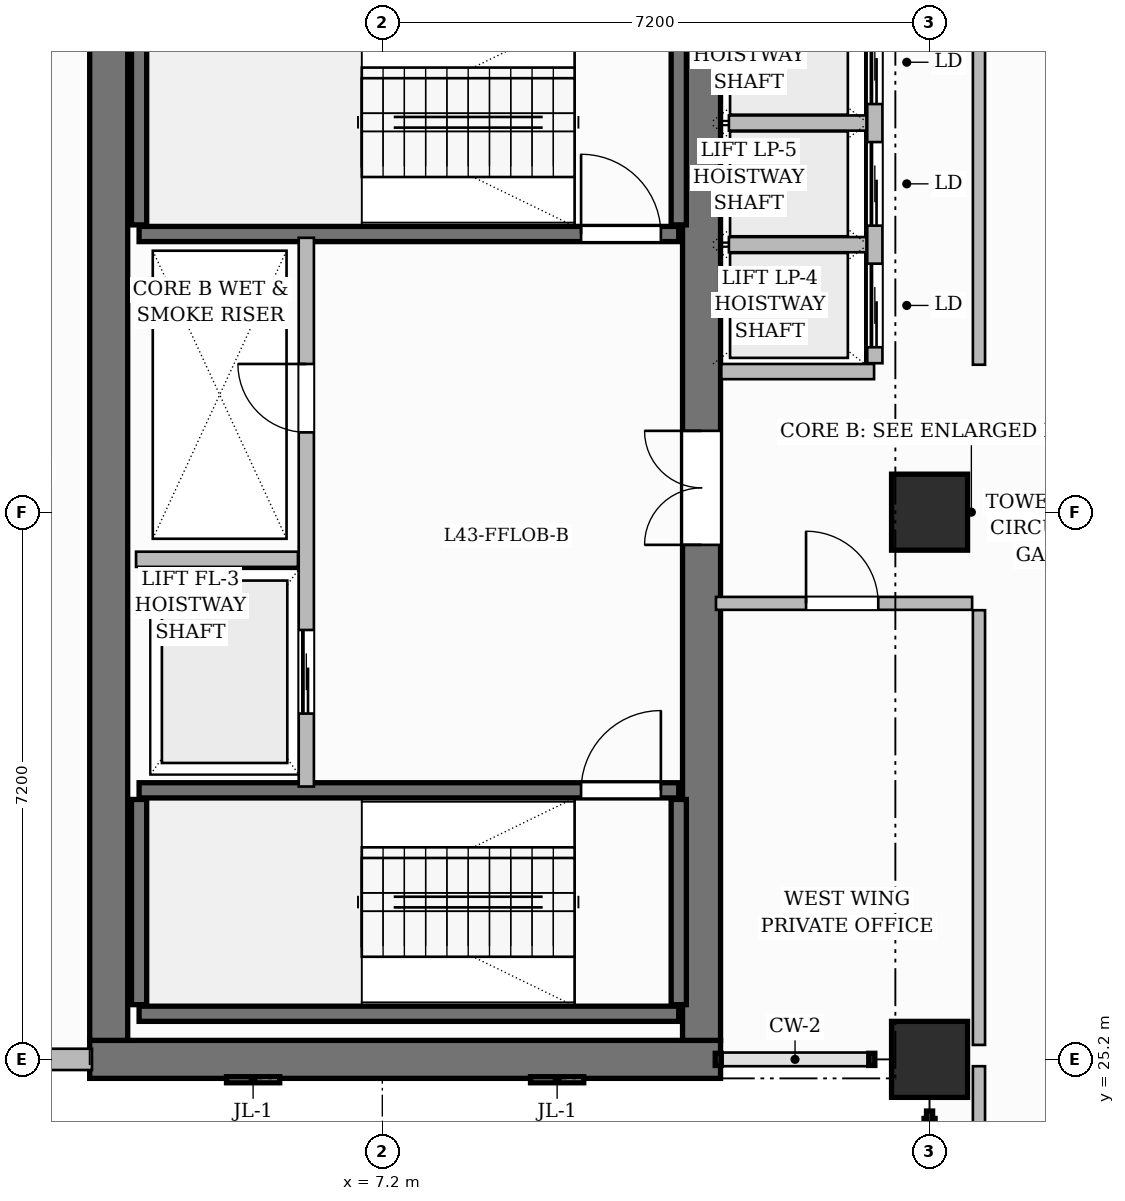
"""IFC4 building model, lengths in metres.
Left out: names, types, materials, properties, quantities, classifications, styles, units other than length and angle.
Written with IfcOpenShell. Run it as: python <this file> out.ifc"""

import sys

from ifc_helpers import new_model, si_unit, direction, frame, frame_2d, origin, origin_2d, place, context, subcontext, project, spatial, rectangle, extrude, source, transform, mapped, element, fill, save


model = new_model("IFC4")
c1 = context("Model", 3, precision=1e-05, world=origin(), true_north=direction((0.0, 1.0)))
c2 = subcontext(c1, "Body", "Model", "MODEL_VIEW")
j1 = project(units=[si_unit("LENGTHUNIT", "METRE"), si_unit("PLANEANGLEUNIT", "RADIAN")], contexts=[c1])
p1 = place(None, origin())
s1 = spatial("IfcSite", under=j1, at=p1, CompositionType="ELEMENT")
p2 = place(p1, origin())
s2 = spatial("IfcBuilding", under=s1, at=p2, CompositionType="ELEMENT")
p3 = place(p2, frame((0.0, 0.0, 173.4)))
s3 = spatial("IfcBuildingStorey", under=s2, at=p3, CompositionType="ELEMENT", Elevation=173.4)
p4 = place(p3, frame((3.35, 25.2, 0.0), z_axis=(0.0, 0.0, 1.0), x_axis=(1.0, 0.0, 0.0)))
e1 = element("IfcWall", 1, at=p4, inside=s3, PredefinedType="SHEAR", context=c2, shape_type="SweptSolid", body=[
    extrude(rectangle(XDim=8.3, YDim=0.5, at=frame_2d((4.15, 0.0))), origin(), (0.0, 0.0, 1.0), 3.85),
])
p5 = place(p3, frame((3.6, 25.45, 0.0), z_axis=(0.0, 0.0, 1.0), x_axis=(0.0, 1.0, 0.0)))
e2 = element("IfcWall", 2, at=p5, inside=s3, PredefinedType="SHEAR", context=c2, shape_type="SweptSolid", body=[
    extrude(rectangle(XDim=13.9, YDim=0.5, at=frame_2d((6.95, 0.0))), origin(), (0.0, 0.0, 1.0), 3.85),
])
p6 = place(p3, frame((11.4, 25.45, 0.0), z_axis=(0.0, 0.0, 1.0), x_axis=(0.0, 1.0, 0.0)))
e3 = element("IfcWall", 3, at=p6, inside=s3, PredefinedType="SHEAR", context=c2, shape_type="SweptSolid", body=[
    extrude(rectangle(XDim=13.9, YDim=0.5, at=frame_2d((6.95, 0.0))), origin(), (0.0, 0.0, 1.0), 3.85),
])
p7 = place(p6, frame((6.52, 0.0, 0.0)))
e4 = element("IfcOpeningElement", 4, at=p7, cuts=e3, PredefinedType="OPENING", context=c2, shape_type="SweptSolid", body=[
    extrude(rectangle(XDim=1.5, YDim=2.2, at=frame_2d((0.75, 1.1))), frame((0.0, 0.26, 0.0), z_axis=(0.0, -1.0, 0.0), x_axis=(1.0, 0.0, 0.0)), (0.0, 0.0, 1.0), 0.52),
])
m1 = source(origin(), c2, "Body", "SweptSolid", [
    extrude(rectangle(XDim=1.0, YDim=1.0, at=origin_2d()), origin(), (0.0, 0.0, 1.0), 3.85),
])
for number, where, z_axis, x_axis in (
    (5, (14.4, 25.2, 0.0), (0.0, 0.0, 1.0), (1.0, 0.0, 0.0)),
    (6, (14.4, 32.4, 0.0), (0.0, 0.0, 1.0), (1.0, 0.0, 0.0)),
):
    element("IfcColumn", number, at=place(p3, frame(where, z_axis=z_axis, x_axis=x_axis)), inside=s3, PredefinedType="COLUMN", context=c2, shape_type="MappedRepresentation", body=[
        mapped(m1, transform((0.0, 0.0, 0.0), scale=1.0)),
    ])
p8 = place(p3, frame((4.0, 25.8, 0.0), z_axis=(0.0, 0.0, 1.0), x_axis=(1.0, 0.0, 0.0)))
e7 = element("IfcWall", 7, at=p8, inside=s3, PredefinedType="SHEAR", context=c2, shape_type="SweptSolid", body=[
    extrude(rectangle(XDim=7.1, YDim=0.2, at=frame_2d((3.55, 0.0))), origin(), (0.0, 0.0, 1.0), 3.85),
])
for number, where, z_axis, x_axis in (
    (8, (4.0, 25.92, 0.0), (0.0, 0.0, 1.0), (0.0, 1.0, 0.0)),
    (9, (11.1, 25.92, 0.0), (0.0, 0.0, 1.0), (0.0, 1.0, 0.0)),
):
    element("IfcWall", number, at=place(p3, frame(where, z_axis=z_axis, x_axis=x_axis)), inside=s3, PredefinedType="SHEAR", context=c2, shape_type="SweptSolid", body=[
        extrude(rectangle(XDim=2.7, YDim=0.2, at=frame_2d((1.35, 0.0))), origin(), (0.0, 0.0, 1.0), 3.85),
    ])
p9 = place(p3, frame((4.0, 28.74, 0.0), z_axis=(0.0, 0.0, 1.0), x_axis=(1.0, 0.0, 0.0)))
e10 = element("IfcWall", 10, at=p9, inside=s3, PredefinedType="SHEAR", context=c2, shape_type="SweptSolid", body=[
    extrude(rectangle(XDim=7.1, YDim=0.2, at=frame_2d((3.55, 0.0))), origin(), (0.0, 0.0, 1.0), 3.85),
])
p10 = place(p9, frame((5.815, 0.0, 0.0)))
e11 = element("IfcOpeningElement", 11, at=p10, cuts=e10, PredefinedType="OPENING", context=c2, shape_type="SweptSolid", body=[
    extrude(rectangle(XDim=1.05, YDim=2.2, at=frame_2d((0.525, 1.1))), frame((0.0, 0.11, 0.0), z_axis=(0.0, -1.0, 0.0), x_axis=(1.0, 0.0, 0.0)), (0.0, 0.0, 1.0), 0.22),
])
for number, where, z_axis, x_axis in (
    (12, (4.0, 36.18, 0.0), (0.0, 0.0, 1.0), (0.0, 1.0, 0.0)),
    (13, (11.1, 36.18, 0.0), (0.0, 0.0, 1.0), (0.0, 1.0, 0.0)),
):
    element("IfcWall", number, at=place(p3, frame(where, z_axis=z_axis, x_axis=x_axis)), inside=s3, PredefinedType="SHEAR", context=c2, shape_type="SweptSolid", body=[
        extrude(rectangle(XDim=2.7, YDim=0.2, at=frame_2d((1.35, 0.0))), origin(), (0.0, 0.0, 1.0), 3.85),
    ])
p11 = place(p3, frame((4.0, 36.06, 0.0), z_axis=(0.0, 0.0, 1.0), x_axis=(1.0, 0.0, 0.0)))
e14 = element("IfcWall", 14, at=p11, inside=s3, PredefinedType="SHEAR", context=c2, shape_type="SweptSolid", body=[
    extrude(rectangle(XDim=7.1, YDim=0.2, at=frame_2d((3.55, 0.0))), origin(), (0.0, 0.0, 1.0), 3.85),
])
p12 = place(p11, frame((5.815, 0.0, 0.0)))
e15 = element("IfcOpeningElement", 15, at=p12, cuts=e14, PredefinedType="OPENING", context=c2, shape_type="SweptSolid", body=[
    extrude(rectangle(XDim=1.05, YDim=2.2, at=frame_2d((0.525, 1.1))), frame((0.0, 0.11, 0.0), z_axis=(0.0, -1.0, 0.0), x_axis=(1.0, 0.0, 0.0)), (0.0, 0.0, 1.0), 0.22),
])
p13 = place(p3, frame((6.2, 28.79, 0.0), z_axis=(0.0, 0.0, 1.0), x_axis=(0.0, 1.0, 0.0)))
e16 = element("IfcWall", 16, at=p13, inside=s3, PredefinedType="PARTITIONING", context=c2, shape_type="SweptSolid", body=[
    extrude(rectangle(XDim=7.22, YDim=0.2, at=frame_2d((3.61, 0.0))), origin(), (0.0, 0.0, 1.0), 3.6),
])
p14 = place(p13, frame((4.66, 0.0, 0.0)))
e17 = element("IfcOpeningElement", 17, at=p14, cuts=e16, PredefinedType="OPENING", context=c2, shape_type="SweptSolid", body=[
    extrude(rectangle(XDim=0.9, YDim=2.1, at=frame_2d((0.45, 1.05))), frame((0.0, 0.11, 0.0), z_axis=(0.0, -1.0, 0.0), x_axis=(1.0, 0.0, 0.0)), (0.0, 0.0, 1.0), 0.22),
])
p15 = place(p13, frame((0.96, 0.0, 0.0)))
e18 = element("IfcOpeningElement", 18, at=p15, cuts=e16, PredefinedType="OPENING", context=c2, shape_type="SweptSolid", body=[
    extrude(rectangle(XDim=1.1, YDim=2.2, at=frame_2d((0.55, 1.1))), frame((0.0, 0.11, 0.0), z_axis=(0.0, -1.0, 0.0), x_axis=(1.0, 0.0, 0.0)), (0.0, 0.0, 1.0), 0.22),
])
p16 = place(p3, frame((3.96, 31.78, 0.0), z_axis=(0.0, 0.0, 1.0), x_axis=(1.0, 0.0, 0.0)))
e19 = element("IfcWall", 19, at=p16, inside=s3, PredefinedType="PARTITIONING", context=c2, shape_type="SweptSolid", body=[
    extrude(rectangle(XDim=2.13, YDim=0.2, at=frame_2d((1.065, 0.0))), origin(), (0.0, 0.0, 1.0), 3.6),
])
p17 = place(p3, frame((11.66, 34.25, 0.0), z_axis=(0.0, 0.0, 1.0), x_axis=(1.0, 0.0, 0.0)))
e20 = element("IfcWall", 20, at=p17, inside=s3, PredefinedType="PARTITIONING", context=c2, shape_type="SweptSolid", body=[
    extrude(rectangle(XDim=2.01, YDim=0.2, at=frame_2d((1.005, 0.0))), origin(), (0.0, 0.0, 1.0), 3.6),
])
p18 = place(p3, frame((13.68, 34.36, 0.0), z_axis=(0.0, 0.0, 1.0), x_axis=(0.0, 1.0, 0.0)))
e21 = element("IfcWall", 21, at=p18, inside=s3, PredefinedType="PARTITIONING", context=c2, shape_type="SweptSolid", body=[
    extrude(rectangle(XDim=4.72, YDim=0.2, at=frame_2d((2.36, 0.0))), origin(), (0.0, 0.0, 1.0), 3.6),
])
p19 = place(p18, frame((0.21, 0.0, 0.0)))
e22 = element("IfcOpeningElement", 22, at=p19, cuts=e21, PredefinedType="OPENING", context=c2, shape_type="SweptSolid", body=[
    extrude(rectangle(XDim=1.1, YDim=2.2, at=frame_2d((0.55, 1.1))), frame((0.0, 0.11, 0.0), z_axis=(0.0, -1.0, 0.0), x_axis=(1.0, 0.0, 0.0)), (0.0, 0.0, 1.0), 0.22),
])
p20 = place(p18, frame((1.81, 0.0, 0.0)))
e23 = element("IfcOpeningElement", 23, at=p20, cuts=e21, PredefinedType="OPENING", context=c2, shape_type="SweptSolid", body=[
    extrude(rectangle(XDim=1.1, YDim=2.2, at=frame_2d((0.55, 1.1))), frame((0.0, 0.11, 0.0), z_axis=(0.0, -1.0, 0.0), x_axis=(1.0, 0.0, 0.0)), (0.0, 0.0, 1.0), 0.22),
])
p21 = place(p18, frame((3.41, 0.0, 0.0)))
e24 = element("IfcOpeningElement", 24, at=p21, cuts=e21, PredefinedType="OPENING", context=c2, shape_type="SweptSolid", body=[
    extrude(rectangle(XDim=1.1, YDim=2.2, at=frame_2d((0.55, 1.1))), frame((0.0, 0.11, 0.0), z_axis=(0.0, -1.0, 0.0), x_axis=(1.0, 0.0, 0.0)), (0.0, 0.0, 1.0), 0.22),
])
for number, where, z_axis, x_axis in (
    (25, (11.76, 35.92, 0.0), (0.0, 0.0, 1.0), (1.0, 0.0, 0.0)),
    (26, (11.76, 37.52, 0.0), (0.0, 0.0, 1.0), (1.0, 0.0, 0.0)),
):
    element("IfcWall", number, at=place(p3, frame(where, z_axis=z_axis, x_axis=x_axis)), inside=s3, PredefinedType="PARTITIONING", context=c2, shape_type="SweptSolid", body=[
        extrude(rectangle(XDim=1.81, YDim=0.2, at=frame_2d((0.905, 0.0))), origin(), (0.0, 0.0, 1.0), 3.6),
    ])
p22 = place(p3, frame((15.05, 11.76, 0.0), z_axis=(0.0, 0.0, 1.0), x_axis=(0.0, 1.0, 0.0)))
e27 = element("IfcWall", 27, at=p22, inside=s3, PredefinedType="PARTITIONING", context=c2, shape_type="SweptSolid", body=[
    extrude(rectangle(XDim=13.35, YDim=0.16, at=frame_2d((6.675, 0.0))), origin(), (0.0, 0.0, 1.0), 3.6),
])
p23 = place(p3, frame((15.05, 34.34, 0.0), z_axis=(0.0, 0.0, 1.0), x_axis=(0.0, 1.0, 0.0)))
e28 = element("IfcWall", 28, at=p23, inside=s3, PredefinedType="PARTITIONING", context=c2, shape_type="SweptSolid", body=[
    extrude(rectangle(XDim=12.312, YDim=0.16, at=frame_2d((6.156, 0.0))), origin(), (0.0, 0.0, 1.0), 3.6),
])
p24 = place(p23, frame((6.535, 0.0, 0.0)))
e29 = element("IfcOpeningElement", 29, at=p24, cuts=e28, PredefinedType="OPENING", context=c2, shape_type="SweptSolid", body=[
    extrude(rectangle(XDim=1.05, YDim=2.25, at=frame_2d((0.525, 1.125))), frame((0.0, 0.09, 0.0), z_axis=(0.0, -1.0, 0.0), x_axis=(1.0, 0.0, 0.0)), (0.0, 0.0, 1.0), 0.18),
])
p25 = place(p23, frame((10.06, 0.0, 0.0)))
e30 = element("IfcOpeningElement", 30, at=p25, cuts=e28, PredefinedType="OPENING", context=c2, shape_type="SweptSolid", body=[
    extrude(rectangle(XDim=1.0, YDim=2.2, at=frame_2d((0.5, 1.1))), frame((0.0, 0.09, 0.0), z_axis=(0.0, -1.0, 0.0), x_axis=(1.0, 0.0, 0.0)), (0.0, 0.0, 1.0), 0.18),
])
p26 = place(p3, frame((15.05, 25.39, 0.0), z_axis=(0.0, 0.0, 1.0), x_axis=(0.0, 1.0, 0.0)))
e31 = element("IfcWall", 31, at=p26, inside=s3, PredefinedType="PARTITIONING", context=c2, shape_type="SweptSolid", body=[
    extrude(rectangle(XDim=5.72, YDim=0.16, at=frame_2d((2.86, 0.0))), origin(), (0.0, 0.0, 1.0), 3.6),
])
p27 = place(p3, frame((11.59, 31.2, 0.0), z_axis=(0.0, 0.0, 1.0), x_axis=(1.0, 0.0, 0.0)))
e32 = element("IfcWall", 32, at=p27, inside=s3, PredefinedType="PARTITIONING", context=c2, shape_type="SweptSolid", body=[
    extrude(rectangle(XDim=3.37, YDim=0.17, at=frame_2d((1.685, 0.0))), origin(), (0.0, 0.0, 1.0), 3.6),
])
p28 = place(p27, frame((1.185, 0.0, 0.0)))
e33 = element("IfcOpeningElement", 33, at=p28, cuts=e32, PredefinedType="OPENING", context=c2, shape_type="SweptSolid", body=[
    extrude(rectangle(XDim=0.95, YDim=2.15, at=frame_2d((0.475, 1.075))), frame((0.0, 0.095, 0.0), z_axis=(0.0, -1.0, 0.0), x_axis=(1.0, 0.0, 0.0)), (0.0, 0.0, 1.0), 0.19),
])
p29 = place(p3, frame((0.0, 25.2, 0.0), z_axis=(0.0, 0.0, 1.0), x_axis=(1.0, 0.0, 0.0)))
e34 = element("IfcWall", 34, at=p29, inside=s3, PredefinedType="SOLIDWALL", context=c2, shape_type="SweptSolid", body=[
    extrude(rectangle(XDim=3.38, YDim=0.28, at=frame_2d((1.69, 0.0))), origin(), (0.0, 0.0, 1.0), 3.6),
])
p30 = place(p29, frame((1.205, 0.0, 0.8)))
e35 = element("IfcOpeningElement", 35, at=p30, cuts=e34, PredefinedType="OPENING", context=c2, shape_type="SweptSolid", body=[
    extrude(rectangle(XDim=1.4, YDim=1.85, at=frame_2d((0.7, 0.925))), frame((0.0, 0.15, 0.0), z_axis=(0.0, -1.0, 0.0), x_axis=(1.0, 0.0, 0.0)), (0.0, 0.0, 1.0), 0.3),
])
m2 = source(origin(), c2, "Body", "SweptSolid", [
    extrude(rectangle(XDim=1.05, YDim=2.2, at=frame_2d((0.525, 1.1))), frame((0.0, 0.025, 0.0), z_axis=(0.0, -1.0, 0.0), x_axis=(1.0, 0.0, 0.0)), (0.0, 0.0, 1.0), 0.05),
])
p31 = place(p10, origin())
e36 = element("IfcDoor", 36, at=p31, inside=s3, OperationType="SINGLE_SWING_RIGHT", PredefinedType="DOOR", context=c2, shape_type="MappedRepresentation", body=[
    mapped(m2, transform((0.0, 0.0, 0.0), scale=1.0)),
])
fill(e11, e36)
p32 = place(p12, origin())
e37 = element("IfcDoor", 37, at=p32, inside=s3, OperationType="SINGLE_SWING_LEFT", PredefinedType="DOOR", context=c2, shape_type="MappedRepresentation", body=[
    mapped(m2, transform((0.0, 0.0, 0.0), scale=1.0)),
])
fill(e15, e37)
m3 = source(origin(), c2, "Body", "SweptSolid", [
    extrude(rectangle(XDim=0.9, YDim=2.1, at=frame_2d((0.45, 1.05))), frame((0.0, 0.025, 0.0), z_axis=(0.0, -1.0, 0.0), x_axis=(1.0, 0.0, 0.0)), (0.0, 0.0, 1.0), 0.05),
])
p33 = place(p14, origin())
e38 = element("IfcDoor", 38, at=p33, inside=s3, OperationType="SINGLE_SWING_RIGHT", PredefinedType="DOOR", context=c2, shape_type="MappedRepresentation", body=[
    mapped(m3, transform((0.0, 0.0, 0.0), scale=1.0)),
])
fill(e17, e38)
m4 = source(origin(), c2, "Body", "SweptSolid", [
    extrude(rectangle(XDim=1.5, YDim=2.2, at=frame_2d((0.75, 1.1))), frame((0.0, 0.025, 0.0), z_axis=(0.0, -1.0, 0.0), x_axis=(1.0, 0.0, 0.0)), (0.0, 0.0, 1.0), 0.05),
])
p34 = place(p7, origin())
e39 = element("IfcDoor", 39, at=p34, inside=s3, OperationType="DOUBLE_DOOR_SINGLE_SWING", PredefinedType="DOOR", context=c2, shape_type="MappedRepresentation", body=[
    mapped(m4, transform((0.0, 0.0, 0.0), scale=1.0)),
])
fill(e4, e39)
m5 = source(origin(), c2, "Body", "SweptSolid", [
    extrude(rectangle(XDim=0.95, YDim=2.15, at=frame_2d((0.475, 1.075))), frame((0.0, 0.025, 0.0), z_axis=(0.0, -1.0, 0.0), x_axis=(1.0, 0.0, 0.0)), (0.0, 0.0, 1.0), 0.05),
])
p35 = place(p28, origin())
e40 = element("IfcDoor", 40, at=p35, inside=s3, OperationType="SINGLE_SWING_LEFT", PredefinedType="DOOR", context=c2, shape_type="MappedRepresentation", body=[
    mapped(m5, transform((0.0, 0.0, 0.0), scale=1.0)),
])
fill(e33, e40)
m6 = source(origin(), c2, "Body", "SweptSolid", [
    extrude(rectangle(XDim=1.1, YDim=2.2, at=frame_2d((0.55, 1.1))), frame((0.0, 0.025, 0.0), z_axis=(0.0, -1.0, 0.0), x_axis=(1.0, 0.0, 0.0)), (0.0, 0.0, 1.0), 0.05),
])
p36 = place(p15, origin())
e41 = element("IfcDoor", 41, at=p36, inside=s3, OperationType="SLIDING_TO_LEFT", PredefinedType="DOOR", context=c2, shape_type="MappedRepresentation", body=[
    mapped(m6, transform((0.0, 0.0, 0.0), scale=1.0)),
])
fill(e18, e41)
p37 = place(p19, origin())
e42 = element("IfcDoor", 42, at=p37, inside=s3, OperationType="SLIDING_TO_LEFT", PredefinedType="DOOR", context=c2, shape_type="MappedRepresentation", body=[
    mapped(m6, transform((0.0, 0.0, 0.0), scale=1.0)),
])
fill(e22, e42)
p38 = place(p20, origin())
e43 = element("IfcDoor", 43, at=p38, inside=s3, OperationType="SLIDING_TO_LEFT", PredefinedType="DOOR", context=c2, shape_type="MappedRepresentation", body=[
    mapped(m6, transform((0.0, 0.0, 0.0), scale=1.0)),
])
fill(e23, e43)
p39 = place(p21, origin())
e44 = element("IfcDoor", 44, at=p39, inside=s3, OperationType="SLIDING_TO_LEFT", PredefinedType="DOOR", context=c2, shape_type="MappedRepresentation", body=[
    mapped(m6, transform((0.0, 0.0, 0.0), scale=1.0)),
])
fill(e24, e44)
save(model, sys.argv[1])
